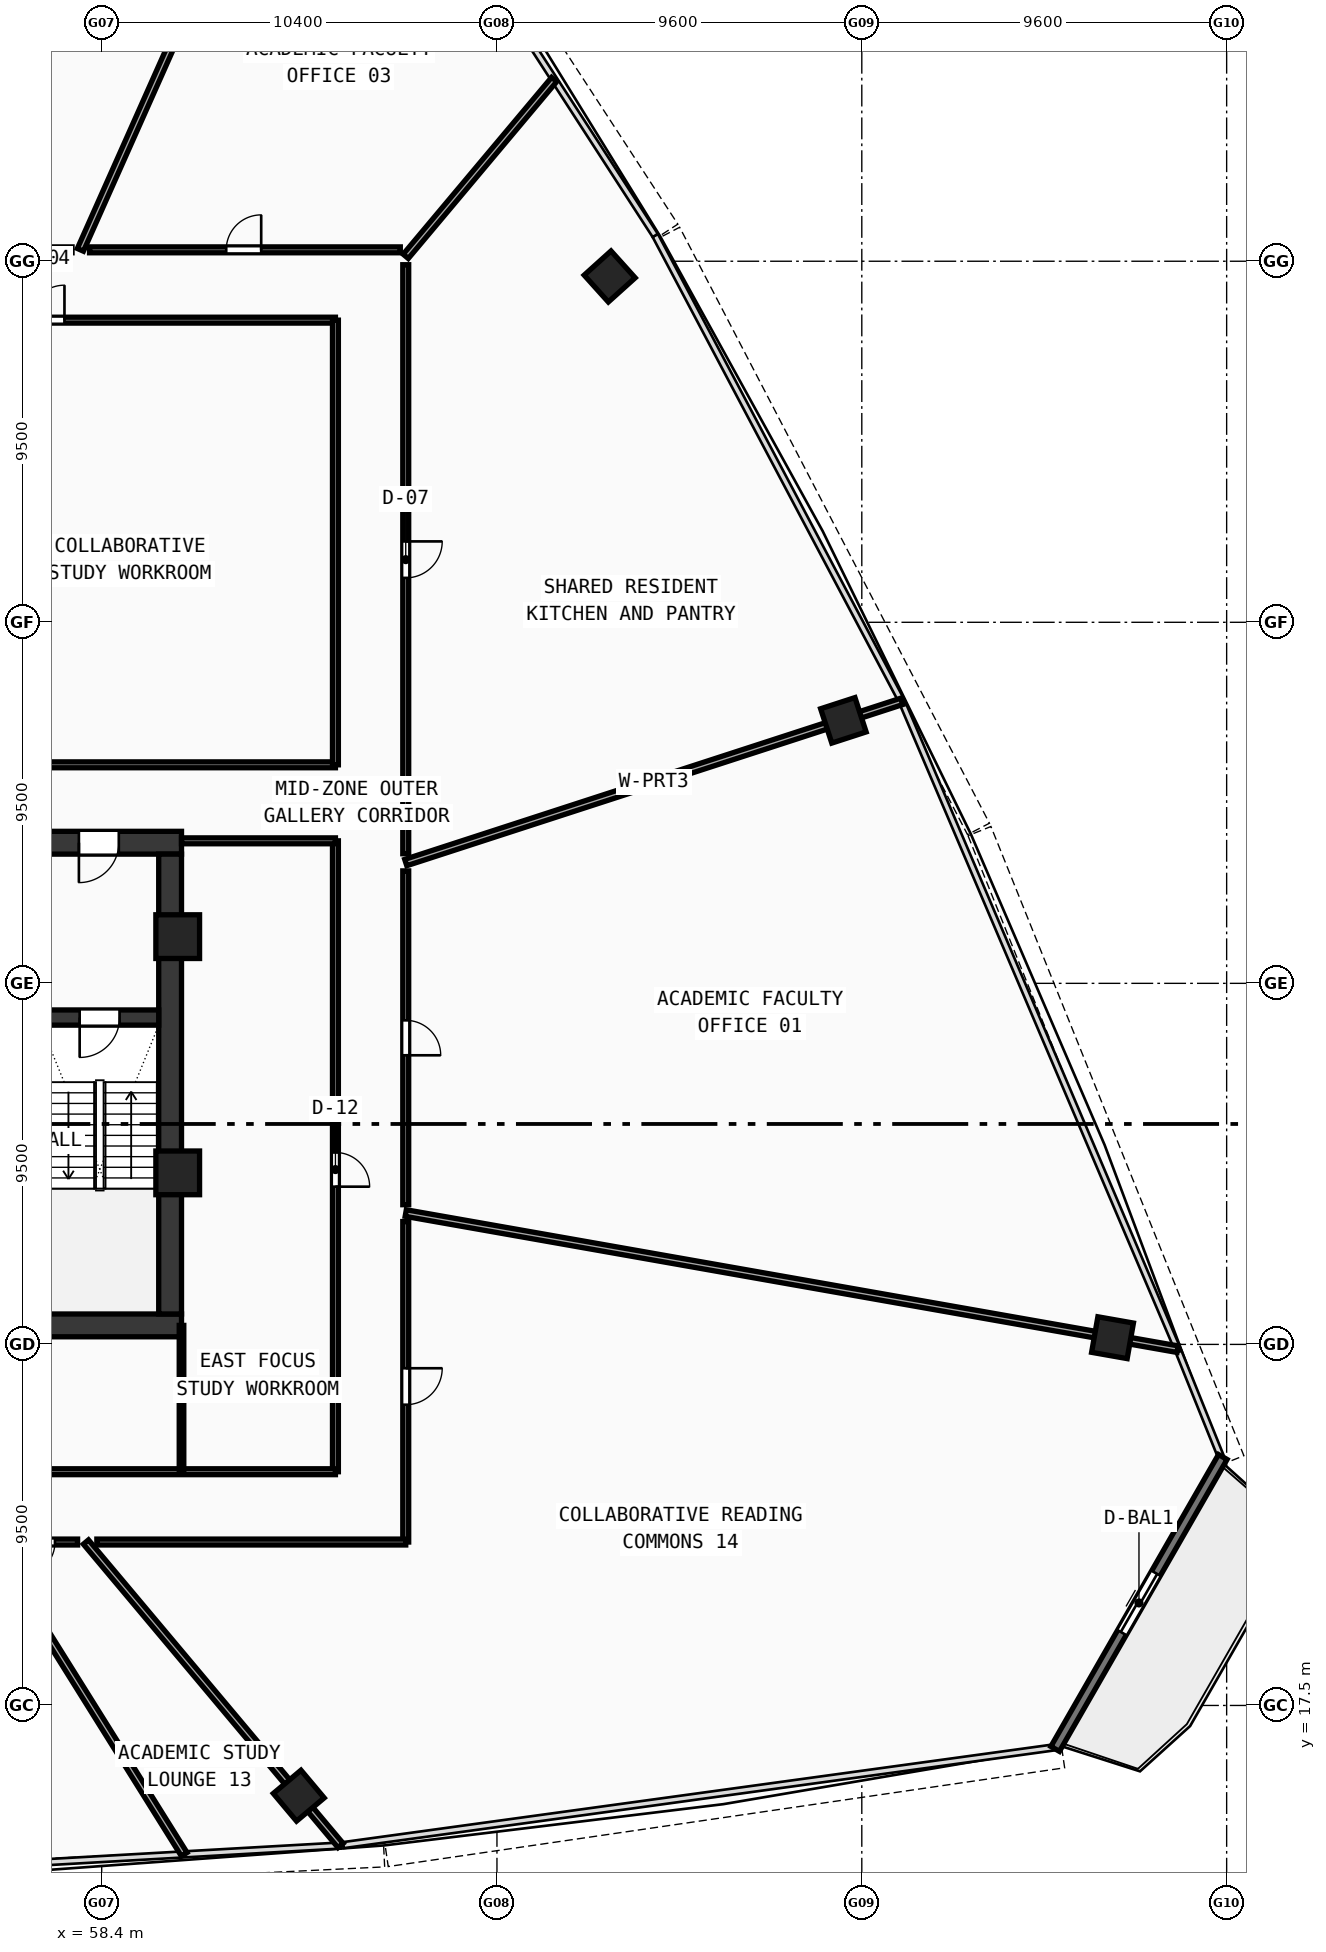
"""IFC4 building model, lengths in metres.
Left out: names, types, materials, properties, quantities, classifications, styles, units other than length and angle.
Written with IfcOpenShell. Run it as: python <this file> out.ifc"""

import sys

from ifc_helpers import new_model, si_unit, direction, frame, frame_2d, origin, origin_with_axes, origin_2d, place, context, subcontext, project, spatial, rectangle, hollow_rectangle, extrude, source, transform, mapped, element, fill, save


model = new_model("IFC4")
c1 = context("Model", 3, precision=1e-05, world=origin(), true_north=direction((0.0, 1.0)))
c2 = subcontext(c1, "Body", "Model", "MODEL_VIEW")
j1 = project(units=[si_unit("LENGTHUNIT", "METRE"), si_unit("PLANEANGLEUNIT", "RADIAN")], contexts=[c1])
p1 = place(None, origin())
s1 = spatial("IfcSite", under=j1, at=p1, CompositionType="ELEMENT")
p2 = place(p1, origin())
s2 = spatial("IfcBuilding", under=s1, at=p2, CompositionType="ELEMENT")
p3 = place(p2, frame((0.0, 0.0, 140.87)))
s3 = spatial("IfcBuildingStorey", under=s2, at=p3, CompositionType="ELEMENT", Elevation=140.87)
p4 = place(p3, frame((35.5, 27.5, 0.0), z_axis=(0.0, 0.0, 1.0), x_axis=(1.0, 0.0, 0.0)))
e1 = element("IfcWall", 1, at=p4, inside=s3, PredefinedType="SHEAR", context=c2, shape_type="SweptSolid", body=[
    extrude(rectangle(XDim=25.0, YDim=0.6, at=frame_2d((12.5, 0.0))), origin(), (0.0, 0.0, 1.0), 3.42),
])
p5 = place(p3, frame((49.2, 40.2, 0.0), z_axis=(0.0, 0.0, 1.0), x_axis=(1.0, 0.0, 0.0)))
e2 = element("IfcWall", 2, at=p5, inside=s3, PredefinedType="SHEAR", context=c2, shape_type="SweptSolid", body=[
    extrude(rectangle(XDim=11.3, YDim=0.6, at=frame_2d((5.65, 0.0))), origin(), (0.0, 0.0, 1.0), 3.42),
])
p6 = place(p5, frame((8.6, 0.0, 0.0)))
e3 = element("IfcOpeningElement", 3, at=p6, cuts=e2, PredefinedType="OPENING", context=c2, shape_type="SweptSolid", body=[
    extrude(rectangle(XDim=1.05, YDim=2.1, at=frame_2d((0.525, 1.05))), frame((0.0, 0.31, 0.0), z_axis=(0.0, -1.0, 0.0), x_axis=(1.0, 0.0, 0.0)), (0.0, 0.0, 1.0), 0.62),
])
p7 = place(p3, frame((60.2, 27.8, 0.0), z_axis=(0.0, 0.0, 1.0), x_axis=(0.0, 1.0, 0.0)))
e4 = element("IfcWall", 4, at=p7, inside=s3, PredefinedType="SHEAR", context=c2, shape_type="SweptSolid", body=[
    extrude(rectangle(XDim=12.1, YDim=0.6, at=frame_2d((6.05, 0.0))), origin(), (0.0, 0.0, 1.0), 3.42),
])
p8 = place(p3, frame((56.8, 35.6, 0.0), z_axis=(0.0, 0.0, 1.0), x_axis=(1.0, 0.0, 0.0)))
e5 = element("IfcWall", 5, at=p8, inside=s3, PredefinedType="SHEAR", context=c2, shape_type="SweptSolid", body=[
    extrude(rectangle(XDim=3.1, YDim=0.4, at=frame_2d((1.55, 0.0))), origin(), (0.0, 0.0, 1.0), 3.42),
])
p9 = place(p8, frame((1.02, 0.0, 0.0)))
e6 = element("IfcOpeningElement", 6, at=p9, cuts=e5, PredefinedType="OPENING", context=c2, shape_type="SweptSolid", body=[
    extrude(rectangle(XDim=1.05, YDim=2.1, at=frame_2d((0.525, 1.05))), frame((0.0, 0.21, 0.0), z_axis=(0.0, -1.0, 0.0), x_axis=(1.0, 0.0, 0.0)), (0.0, 0.0, 1.0), 0.42),
])
m1 = source(origin(), c2, "Body", "SweptSolid", [
    extrude(hollow_rectangle(XDim=1.15, YDim=1.15, WallThickness=0.048, at=origin_2d()), origin(), (0.0, 0.0, 1.0), 3.68),
])
for number, where, z_axis, x_axis in (
    (7, (60.4, 31.513, -0.26), (0.0, 0.0, 1.0), (1.0, 0.0, 0.0)),
    (8, (60.4, 37.729, -0.26), (0.0, 0.0, 1.0), (1.0, 0.0, 0.0)),
):
    element("IfcColumn", number, at=place(p3, frame(where, z_axis=z_axis, x_axis=x_axis)), inside=s3, PredefinedType="COLUMN", context=c2, shape_type="MappedRepresentation", body=[
        mapped(m1, transform((0.0, 0.0, 0.0), scale=1.0)),
    ])
m2 = source(origin(), c2, "Body", "SweptSolid", [
    extrude(hollow_rectangle(XDim=0.95, YDim=0.95, WallThickness=0.04, at=origin_2d()), origin(), (0.0, 0.0, 1.0), 3.68),
])
for number, where, z_axis, x_axis in (
    (9, (63.585, 15.126, -0.26), (0.0, 0.0, 1.0), (0.766, 0.643, 0.0)),
    (10, (84.997, 27.177, -0.26), (0.0, 0.0, 1.0), (0.174, 0.985, 0.0)),
    (11, (77.915, 43.42, -0.26), (0.0, 0.0, 1.0), (-0.309, 0.951, 0.0)),
    (12, (71.766, 55.099, -0.26), (0.0, 0.0, 1.0), (-0.669, 0.743, 0.0)),
):
    element("IfcColumn", number, at=place(p3, frame(where, z_axis=z_axis, x_axis=x_axis)), inside=s3, PredefinedType="COLUMN", context=c2, shape_type="MappedRepresentation", body=[
        mapped(m2, transform((0.0, 0.0, 0.0), scale=1.0)),
    ])
p10 = place(p3, frame((83.488, 16.356, 0.0), z_axis=(0.0, 0.0, 1.0), x_axis=(0.497915888941, 0.867225326856, 0.0)))
e13 = element("IfcWall", 13, at=p10, inside=s3, PredefinedType="STANDARD", context=c2, shape_type="SweptSolid", body=[
    extrude(rectangle(XDim=8.858, YDim=0.26, at=frame_2d((4.429, 0.0))), origin(), (0.0, 0.0, 1.0), 3.42),
])
p11 = place(p10, frame((3.529, 0.0, 0.0)))
e14 = element("IfcOpeningElement", 14, at=p11, cuts=e13, PredefinedType="OPENING", context=c2, shape_type="SweptSolid", body=[
    extrude(rectangle(XDim=1.8, YDim=2.15, at=frame_2d((0.9, 1.075))), frame((0.0, 0.14, 0.0), z_axis=(0.0, -1.0, 0.0), x_axis=(1.0, 0.0, 0.0)), (0.0, 0.0, 1.0), 0.28),
])
p12 = place(p3, frame((31.45, 42.25, 0.0), z_axis=(0.0, 0.0, 1.0), x_axis=(1.0, 0.0, 0.0)))
e15 = element("IfcWall", 15, at=p12, inside=s3, PredefinedType="PARTITIONING", context=c2, shape_type="SweptSolid", body=[
    extrude(rectangle(XDim=33.1, YDim=0.155, at=frame_2d((16.55, 0.0))), origin(), (0.0, 0.0, 1.0), 2.77),
])
p13 = place(p3, frame((31.45, 53.95, 0.0), z_axis=(0.0, 0.0, 1.0), x_axis=(1.0, 0.0, 0.0)))
e16 = element("IfcWall", 16, at=p13, inside=s3, PredefinedType="PARTITIONING", context=c2, shape_type="SweptSolid", body=[
    extrude(rectangle(XDim=33.1, YDim=0.155, at=frame_2d((16.55, 0.0))), origin(), (0.0, 0.0, 1.0), 2.77),
])
p14 = place(p13, frame((8.0, 0.0, 0.0)))
e17 = element("IfcOpeningElement", 17, at=p14, cuts=e16, PredefinedType="OPENING", context=c2, shape_type="SweptSolid", body=[
    extrude(rectangle(XDim=0.92, YDim=2.1, at=frame_2d((0.46, 1.05))), frame((0.0, 0.087, 0.0), z_axis=(0.0, -1.0, 0.0), x_axis=(1.0, 0.0, 0.0)), (0.0, 0.0, 1.0), 0.175),
])
p15 = place(p13, frame((25.05, 0.0, 0.0)))
e18 = element("IfcOpeningElement", 18, at=p15, cuts=e16, PredefinedType="OPENING", context=c2, shape_type="SweptSolid", body=[
    extrude(rectangle(XDim=0.92, YDim=2.1, at=frame_2d((0.46, 1.05))), frame((0.0, 0.087, 0.0), z_axis=(0.0, -1.0, 0.0), x_axis=(1.0, 0.0, 0.0)), (0.0, 0.0, 1.0), 0.175),
])
p16 = place(p3, frame((64.55, 42.25, 0.0), z_axis=(0.0, 0.0, 1.0), x_axis=(0.0, 1.0, 0.0)))
e19 = element("IfcWall", 19, at=p16, inside=s3, PredefinedType="PARTITIONING", context=c2, shape_type="SweptSolid", body=[
    extrude(rectangle(XDim=11.7, YDim=0.155, at=frame_2d((5.85, 0.0))), origin(), (0.0, 0.0, 1.0), 2.77),
])
p17 = place(p3, frame((64.55, 23.65, 0.0), z_axis=(0.0, 0.0, 1.0), x_axis=(0.0, 1.0, 0.0)))
e20 = element("IfcWall", 20, at=p17, inside=s3, PredefinedType="PARTITIONING", context=c2, shape_type="SweptSolid", body=[
    extrude(rectangle(XDim=16.6, YDim=0.155, at=frame_2d((8.3, 0.0))), origin(), (0.0, 0.0, 1.0), 2.77),
])
p18 = place(p17, frame((7.5, 0.0, 0.0)))
e21 = element("IfcOpeningElement", 21, at=p18, cuts=e20, PredefinedType="OPENING", context=c2, shape_type="SweptSolid", body=[
    extrude(rectangle(XDim=0.9, YDim=2.08, at=frame_2d((0.45, 1.04))), frame((0.0, 0.087, 0.0), z_axis=(0.0, -1.0, 0.0), x_axis=(1.0, 0.0, 0.0)), (0.0, 0.0, 1.0), 0.175),
])
p19 = place(p3, frame((31.45, 23.65, 0.0), z_axis=(0.0, 0.0, 1.0), x_axis=(1.0, 0.0, 0.0)))
e22 = element("IfcWall", 22, at=p19, inside=s3, PredefinedType="PARTITIONING", context=c2, shape_type="SweptSolid", body=[
    extrude(rectangle(XDim=33.1, YDim=0.155, at=frame_2d((16.55, 0.0))), origin(), (0.0, 0.0, 1.0), 2.77),
])
p20 = place(p19, frame((16.0, 0.0, 0.0)))
e23 = element("IfcOpeningElement", 23, at=p20, cuts=e22, PredefinedType="OPENING", context=c2, shape_type="SweptSolid", body=[
    extrude(rectangle(XDim=0.92, YDim=2.1, at=frame_2d((0.46, 1.05))), frame((0.0, 0.087, 0.0), z_axis=(0.0, -1.0, 0.0), x_axis=(1.0, 0.0, 0.0)), (0.0, 0.0, 1.0), 0.175),
])
p21 = place(p3, frame((60.5, 40.25, 0.0), z_axis=(0.0, 0.0, 1.0), x_axis=(1.0, 0.0, 0.0)))
e24 = element("IfcWall", 24, at=p21, inside=s3, PredefinedType="PARTITIONING", context=c2, shape_type="SweptSolid", body=[
    extrude(rectangle(XDim=4.05, YDim=0.155, at=frame_2d((2.025, 0.0))), origin(), (0.0, 0.0, 1.0), 3.42),
])
p22 = place(p3, frame((60.5, 23.65, 0.0), z_axis=(0.0, 0.0, 1.0), x_axis=(0.0, 1.0, 0.0)))
e25 = element("IfcWall", 25, at=p22, inside=s3, PredefinedType="PARTITIONING", context=c2, shape_type="SweptSolid", body=[
    extrude(rectangle(XDim=3.85, YDim=0.12, at=frame_2d((1.925, 0.0))), origin(), (0.0, 0.0, 1.0), 3.02),
])
p23 = place(p3, frame((66.4, 39.678, 0.0), z_axis=(0.0, 0.0, 1.0), x_axis=(0.951057598357, 0.309013664112, 0.0)))
e26 = element("IfcWall", 26, at=p23, inside=s3, PredefinedType="PARTITIONING", context=c2, shape_type="SweptSolid", body=[
    extrude(rectangle(XDim=13.723, YDim=0.175, at=frame_2d((6.862, 0.0))), origin(), (0.0, 0.0, 1.0), 2.77),
])
p24 = place(p3, frame((66.4, 55.628, 0.0), z_axis=(0.0, 0.0, 1.0), x_axis=(0.642804736834, 0.766030071409, 0.0)))
e27 = element("IfcWall", 27, at=p24, inside=s3, PredefinedType="PARTITIONING", context=c2, shape_type="SweptSolid", body=[
    extrude(rectangle(XDim=6.076, YDim=0.175, at=frame_2d((3.038, 0.0))), origin(), (0.0, 0.0, 1.0), 2.77),
])
p25 = place(p3, frame((57.84, 55.8, 0.0), z_axis=(0.0, 0.0, 1.0), x_axis=(0.406735812773, 0.913545827317, 0.0)))
e28 = element("IfcWall", 28, at=p25, inside=s3, PredefinedType="PARTITIONING", context=c2, shape_type="SweptSolid", body=[
    extrude(rectangle(XDim=15.394, YDim=0.175, at=frame_2d((7.697, 0.0))), origin(), (0.0, 0.0, 1.0), 2.77),
])
p26 = place(p3, frame((55.436, 21.8, 0.0), z_axis=(0.0, 0.0, 1.0), x_axis=(0.529931002604, -0.848040761096, 0.0)))
e29 = element("IfcWall", 29, at=p26, inside=s3, PredefinedType="PARTITIONING", context=c2, shape_type="SweptSolid", body=[
    extrude(rectangle(XDim=9.691, YDim=0.175, at=frame_2d((4.845, 0.0))), origin(), (0.0, 0.0, 1.0), 2.77),
])
p27 = place(p3, frame((57.985, 21.8, 0.0), z_axis=(0.0, 0.0, 1.0), x_axis=(0.642781677101, -0.76604942111, 0.0)))
e30 = element("IfcWall", 30, at=p27, inside=s3, PredefinedType="PARTITIONING", context=c2, shape_type="SweptSolid", body=[
    extrude(rectangle(XDim=10.424, YDim=0.175, at=frame_2d((5.212, 0.0))), origin(), (0.0, 0.0, 1.0), 2.77),
])
p28 = place(p3, frame((66.4, 30.456, 0.0), z_axis=(0.0, 0.0, 1.0), x_axis=(0.984807623882, -0.173648909998, 0.0)))
e31 = element("IfcWall", 31, at=p28, inside=s3, PredefinedType="PARTITIONING", context=c2, shape_type="SweptSolid", body=[
    extrude(rectangle(XDim=20.622, YDim=0.175, at=frame_2d((10.311, 0.0))), origin(), (0.0, 0.0, 1.0), 2.77),
])
p29 = place(p3, frame((52.391, 55.8, 0.0), z_axis=(0.0, 0.0, 1.0), x_axis=(1.0, 0.0, 0.0)))
e32 = element("IfcWall", 32, at=p29, inside=s3, PredefinedType="PARTITIONING", context=c2, shape_type="SweptSolid", body=[
    extrude(rectangle(XDim=5.229, YDim=0.155, at=frame_2d((2.614, 0.0))), origin(), (0.0, 0.0, 1.0), 2.77),
])
p30 = place(p3, frame((58.08, 55.8, 0.0), z_axis=(0.0, 0.0, 1.0), x_axis=(1.0, 0.0, 0.0)))
e33 = element("IfcWall", 33, at=p30, inside=s3, PredefinedType="PARTITIONING", context=c2, shape_type="SweptSolid", body=[
    extrude(rectangle(XDim=8.177, YDim=0.155, at=frame_2d((4.088, 0.0))), origin(), (0.0, 0.0, 1.0), 3.02),
])
p31 = place(p30, frame((3.596, 0.0, 0.0)))
e34 = element("IfcOpeningElement", 34, at=p31, cuts=e33, PredefinedType="OPENING", context=c2, shape_type="SweptSolid", body=[
    extrude(rectangle(XDim=0.92, YDim=2.1, at=frame_2d((0.46, 1.05))), frame((0.0, 0.087, 0.0), z_axis=(0.0, -1.0, 0.0), x_axis=(1.0, 0.0, 0.0)), (0.0, 0.0, 1.0), 0.175),
])
p32 = place(p3, frame((66.4, 55.408, 0.0), z_axis=(0.0, 0.0, 1.0), x_axis=(0.0, -1.0, 0.0)))
e35 = element("IfcWall", 35, at=p32, inside=s3, PredefinedType="PARTITIONING", context=c2, shape_type="SweptSolid", body=[
    extrude(rectangle(XDim=15.499, YDim=0.155, at=frame_2d((7.749, 0.0))), origin(), (0.0, 0.0, 1.0), 2.77),
])
p33 = place(p32, frame((7.28, 0.0, 0.0)))
e36 = element("IfcOpeningElement", 36, at=p33, cuts=e35, PredefinedType="OPENING", context=c2, shape_type="SweptSolid", body=[
    extrude(rectangle(XDim=0.96, YDim=2.12, at=frame_2d((0.48, 1.06))), frame((0.0, 0.087, 0.0), z_axis=(0.0, -1.0, 0.0), x_axis=(1.0, 0.0, 0.0)), (0.0, 0.0, 1.0), 0.175),
])
p34 = place(p3, frame((66.4, 39.459, 0.0), z_axis=(0.0, 0.0, 1.0), x_axis=(0.0, -1.0, 0.0)))
e37 = element("IfcWall", 37, at=p34, inside=s3, PredefinedType="PARTITIONING", context=c2, shape_type="SweptSolid", body=[
    extrude(rectangle(XDim=8.783, YDim=0.155, at=frame_2d((4.392, 0.0))), origin(), (0.0, 0.0, 1.0), 3.42),
])
p35 = place(p34, frame((3.932, 0.0, 0.0)))
e38 = element("IfcOpeningElement", 38, at=p35, cuts=e37, PredefinedType="OPENING", context=c2, shape_type="SweptSolid", body=[
    extrude(rectangle(XDim=0.92, YDim=2.1, at=frame_2d((0.46, 1.05))), frame((0.0, 0.087, 0.0), z_axis=(0.0, -1.0, 0.0), x_axis=(1.0, 0.0, 0.0)), (0.0, 0.0, 1.0), 0.175),
])
p36 = place(p3, frame((66.4, 30.232, 0.0), z_axis=(0.0, 0.0, 1.0), x_axis=(0.0, -1.0, 0.0)))
e39 = element("IfcWall", 39, at=p36, inside=s3, PredefinedType="PARTITIONING", context=c2, shape_type="SweptSolid", body=[
    extrude(rectangle(XDim=8.432, YDim=0.155, at=frame_2d((4.216, 0.0))), origin(), (0.0, 0.0, 1.0), 3.02),
])
p37 = place(p36, frame((3.859, 0.0, 0.0)))
e40 = element("IfcOpeningElement", 40, at=p37, cuts=e39, PredefinedType="OPENING", context=c2, shape_type="SweptSolid", body=[
    extrude(rectangle(XDim=0.96, YDim=2.12, at=frame_2d((0.48, 1.06))), frame((0.0, 0.087, 0.0), z_axis=(0.0, -1.0, 0.0), x_axis=(1.0, 0.0, 0.0)), (0.0, 0.0, 1.0), 0.175),
])
p38 = place(p3, frame((66.4, 21.8, 0.0), z_axis=(0.0, 0.0, 1.0), x_axis=(-1.0, 0.0, 0.0)))
e41 = element("IfcWall", 41, at=p38, inside=s3, PredefinedType="PARTITIONING", context=c2, shape_type="SweptSolid", body=[
    extrude(rectangle(XDim=8.127, YDim=0.155, at=frame_2d((4.064, 0.0))), origin(), (0.0, 0.0, 1.0), 3.02),
])
p39 = place(p3, frame((57.765, 21.8, 0.0), z_axis=(0.0, 0.0, 1.0), x_axis=(-1.0, 0.0, 0.0)))
e42 = element("IfcWall", 42, at=p39, inside=s3, PredefinedType="PARTITIONING", context=c2, shape_type="SweptSolid", body=[
    extrude(rectangle(XDim=2.07, YDim=0.155, at=frame_2d((1.035, 0.0))), origin(), (0.0, 0.0, 1.0), 2.77),
])
p40 = place(p39, frame((0.595, 0.0, 0.0)))
e43 = element("IfcOpeningElement", 43, at=p40, cuts=e42, PredefinedType="OPENING", context=c2, shape_type="SweptSolid", body=[
    extrude(rectangle(XDim=0.9, YDim=2.08, at=frame_2d((0.45, 1.04))), frame((0.0, 0.087, 0.0), z_axis=(0.0, -1.0, 0.0), x_axis=(1.0, 0.0, 0.0)), (0.0, 0.0, 1.0), 0.175),
])
m3 = source(origin(), c2, "Body", "SweptSolid", [
    extrude(rectangle(XDim=1.8, YDim=2.15, at=frame_2d((0.9, 1.075))), frame((0.0, 0.025, 0.0), z_axis=(0.0, -1.0, 0.0), x_axis=(1.0, 0.0, 0.0)), (0.0, 0.0, 1.0), 0.05),
])
p41 = place(p11, origin_with_axes())
e44 = element("IfcDoor", 44, at=p41, inside=s3, OperationType="DOUBLE_DOOR_SLIDING", PredefinedType="DOOR", context=c2, shape_type="MappedRepresentation", body=[
    mapped(m3, transform((0.0, 0.0, 0.0), scale=1.0)),
])
fill(e14, e44)
m4 = source(origin(), c2, "Body", "SweptSolid", [
    extrude(rectangle(XDim=1.05, YDim=2.1, at=frame_2d((0.525, 1.05))), frame((0.0, 0.025, 0.0), z_axis=(0.0, -1.0, 0.0), x_axis=(1.0, 0.0, 0.0)), (0.0, 0.0, 1.0), 0.05),
])
p42 = place(p9, frame((1.05, 0.0, 0.0), z_axis=(0.0, 0.0, 1.0), x_axis=(-1.0, 0.0, 0.0)))
e45 = element("IfcDoor", 45, at=p42, inside=s3, OperationType="SINGLE_SWING_RIGHT", PredefinedType="DOOR", context=c2, shape_type="MappedRepresentation", body=[
    mapped(m4, transform((0.0, 0.0, 0.0), scale=1.0)),
])
fill(e6, e45)
p43 = place(p6, frame((1.05, 0.0, 0.0), z_axis=(0.0, 0.0, 1.0), x_axis=(-1.0, 0.0, 0.0)))
e46 = element("IfcDoor", 46, at=p43, inside=s3, OperationType="SINGLE_SWING_RIGHT", PredefinedType="DOOR", context=c2, shape_type="MappedRepresentation", body=[
    mapped(m4, transform((0.0, 0.0, 0.0), scale=1.0)),
])
fill(e3, e46)
m5 = source(origin(), c2, "Body", "SweptSolid", [
    extrude(rectangle(XDim=0.92, YDim=2.1, at=frame_2d((0.46, 1.05))), frame((0.0, 0.025, 0.0), z_axis=(0.0, -1.0, 0.0), x_axis=(1.0, 0.0, 0.0)), (0.0, 0.0, 1.0), 0.05),
])
p44 = place(p15, origin_with_axes())
e47 = element("IfcDoor", 47, at=p44, inside=s3, OperationType="SINGLE_SWING_RIGHT", PredefinedType="DOOR", context=c2, shape_type="MappedRepresentation", body=[
    mapped(m5, transform((0.0, 0.0, 0.0), scale=1.0)),
])
fill(e18, e47)
m6 = source(origin(), c2, "Body", "SweptSolid", [
    extrude(rectangle(XDim=0.9, YDim=2.08, at=frame_2d((0.45, 1.04))), frame((0.0, 0.025, 0.0), z_axis=(0.0, -1.0, 0.0), x_axis=(1.0, 0.0, 0.0)), (0.0, 0.0, 1.0), 0.05),
])
p45 = place(p18, frame((0.9, 0.0, 0.0), z_axis=(0.0, 0.0, 1.0), x_axis=(-1.0, 0.0, 0.0)))
e48 = element("IfcDoor", 48, at=p45, inside=s3, OperationType="SINGLE_SWING_RIGHT", PredefinedType="DOOR", context=c2, shape_type="MappedRepresentation", body=[
    mapped(m6, transform((0.0, 0.0, 0.0), scale=1.0)),
])
fill(e21, e48)
p46 = place(p35, origin_with_axes())
e49 = element("IfcDoor", 49, at=p46, inside=s3, OperationType="SINGLE_SWING_RIGHT", PredefinedType="DOOR", context=c2, shape_type="MappedRepresentation", body=[
    mapped(m5, transform((0.0, 0.0, 0.0), scale=1.0)),
])
fill(e38, e49)
m7 = source(origin(), c2, "Body", "SweptSolid", [
    extrude(rectangle(XDim=0.96, YDim=2.12, at=frame_2d((0.48, 1.06))), frame((0.0, 0.025, 0.0), z_axis=(0.0, -1.0, 0.0), x_axis=(1.0, 0.0, 0.0)), (0.0, 0.0, 1.0), 0.05),
])
p47 = place(p33, origin_with_axes())
e50 = element("IfcDoor", 50, at=p47, inside=s3, OperationType="SINGLE_SWING_LEFT", PredefinedType="DOOR", context=c2, shape_type="MappedRepresentation", body=[
    mapped(m7, transform((0.0, 0.0, 0.0), scale=1.0)),
])
fill(e36, e50)
p48 = place(p31, origin_with_axes())
e51 = element("IfcDoor", 51, at=p48, inside=s3, OperationType="SINGLE_SWING_RIGHT", PredefinedType="DOOR", context=c2, shape_type="MappedRepresentation", body=[
    mapped(m5, transform((0.0, 0.0, 0.0), scale=1.0)),
])
fill(e34, e51)
p49 = place(p40, origin_with_axes())
e52 = element("IfcDoor", 52, at=p49, inside=s3, OperationType="SINGLE_SWING_RIGHT", PredefinedType="DOOR", context=c2, shape_type="MappedRepresentation", body=[
    mapped(m6, transform((0.0, 0.0, 0.0), scale=1.0)),
])
fill(e43, e52)
p50 = place(p37, origin_with_axes())
e53 = element("IfcDoor", 53, at=p50, inside=s3, OperationType="SINGLE_SWING_LEFT", PredefinedType="DOOR", context=c2, shape_type="MappedRepresentation", body=[
    mapped(m7, transform((0.0, 0.0, 0.0), scale=1.0)),
])
fill(e40, e53)
save(model, sys.argv[1])
